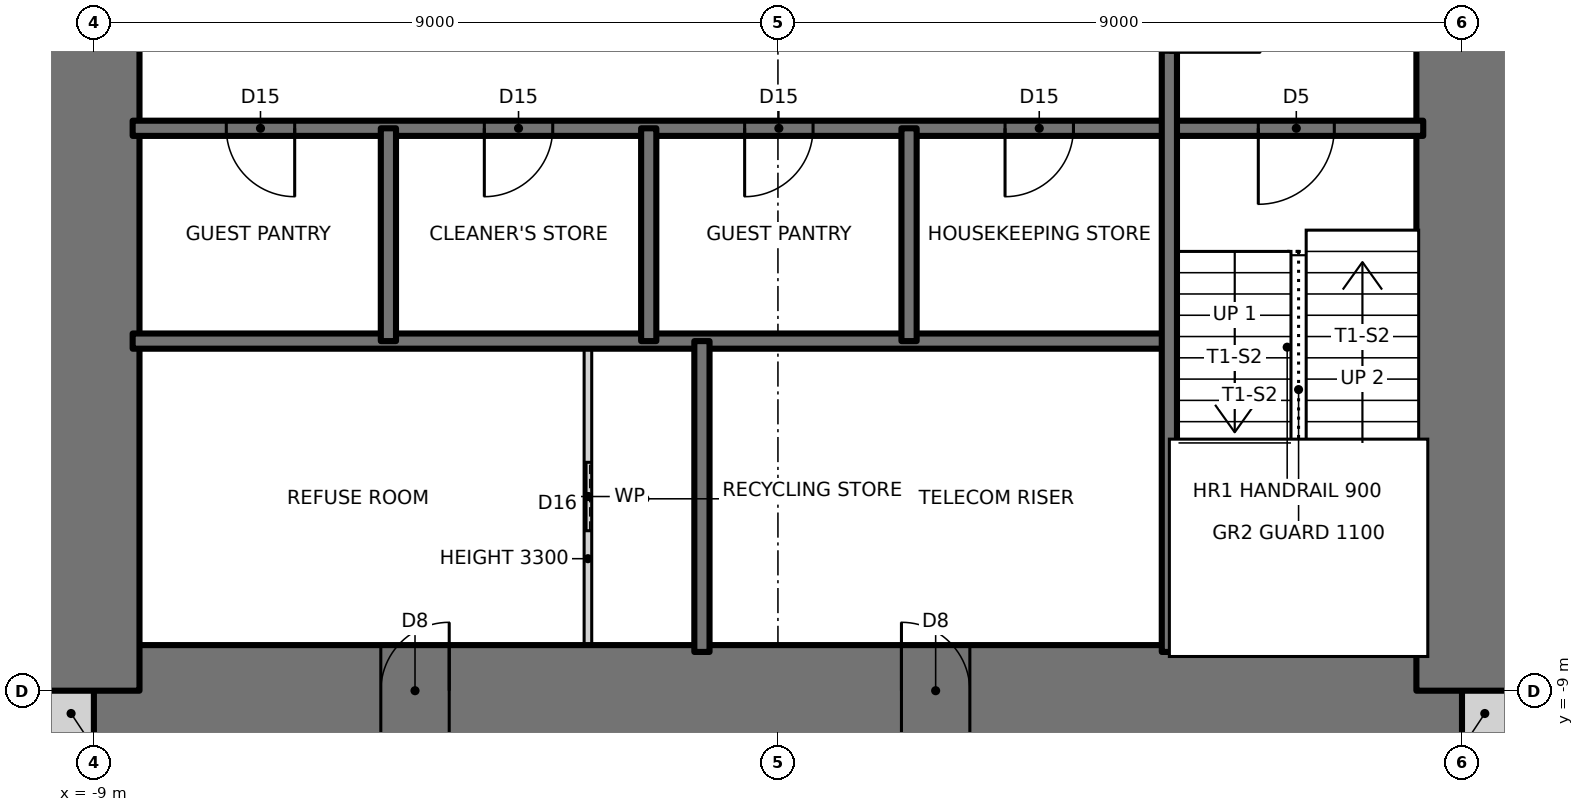
"""IFC4 building model, lengths in metres.
Left out: names, types, materials, properties, quantities, classifications, styles, units other than length and angle.
Written with IfcOpenShell. Run it as: python <this file> out.ifc"""

import sys

from ifc_helpers import new_model, si_unit, direction, frame, frame_2d, origin, place, context, subcontext, project, spatial, rectangle, extrude, element, fill, save


model = new_model("IFC4")
c1 = context("Model", 3, precision=1e-05, world=origin(), true_north=direction((0.0, 1.0)))
c2 = subcontext(c1, "Body", "Model", "MODEL_VIEW")
j1 = project(units=[si_unit("LENGTHUNIT", "METRE"), si_unit("PLANEANGLEUNIT", "RADIAN")], contexts=[c1])
p1 = place(None, origin())
s1 = spatial("IfcSite", under=j1, at=p1, CompositionType="ELEMENT")
p2 = place(p1, origin())
s2 = spatial("IfcBuilding", under=s1, at=p2, CompositionType="ELEMENT")
p3 = place(p2, frame((0.0, 0.0, 243.0)))
s3 = spatial("IfcBuildingStorey", under=s2, at=p3, CompositionType="ELEMENT", Elevation=243.0)
for number, where, z_axis, x_axis in (
    (1, (-9.6, -9.3, 0.0), (0.0, 0.0, 1.0), (1.0, 0.0, 0.0)),
    (2, (9.0, -9.3, 0.0), (0.0, 0.0, 1.0), (1.0, 0.0, 0.0)),
):
    element("IfcWall", number, at=place(p3, frame(where, z_axis=z_axis, x_axis=x_axis)), inside=s3, PredefinedType="SOLIDWALL", context=c2, shape_type="SweptSolid", body=[
        extrude(rectangle(XDim=0.6, YDim=0.6, at=frame_2d((0.3, 0.0))), origin(), (0.0, 0.0, 1.0), 3.5),
    ])
p4 = place(p3, frame((-9.0, -9.0, 0.0), z_axis=(0.0, 0.0, 1.0), x_axis=(1.0, 0.0, 0.0)))
e3 = element("IfcWall", 3, at=p4, inside=s3, PredefinedType="SHEAR", context=c2, shape_type="SweptSolid", body=[
    extrude(rectangle(XDim=18.0, YDim=1.2, at=frame_2d((9.0, 0.0))), origin(), (0.0, 0.0, 1.0), 3.5),
])
p5 = place(p4, frame((3.775, 0.0, 0.0)))
e4 = element("IfcOpeningElement", 4, at=p5, cuts=e3, PredefinedType="OPENING", context=c2, shape_type="SweptSolid", body=[
    extrude(rectangle(XDim=0.9, YDim=2.1, at=frame_2d((0.45, 1.05))), frame((0.0, 0.61, 0.0), z_axis=(0.0, -1.0, 0.0), x_axis=(1.0, 0.0, 0.0)), (0.0, 0.0, 1.0), 1.22),
])
p6 = place(p4, frame((10.625, 0.0, 0.0)))
e5 = element("IfcOpeningElement", 5, at=p6, cuts=e3, PredefinedType="OPENING", context=c2, shape_type="SweptSolid", body=[
    extrude(rectangle(XDim=0.9, YDim=2.1, at=frame_2d((0.45, 1.05))), frame((0.0, 0.61, 0.0), z_axis=(0.0, -1.0, 0.0), x_axis=(1.0, 0.0, 0.0)), (0.0, 0.0, 1.0), 1.22),
])
p7 = place(p3, frame((9.0, -9.0, 0.0), z_axis=(0.0, 0.0, 1.0), x_axis=(0.0, 1.0, 0.0)))
e6 = element("IfcWall", 6, at=p7, inside=s3, PredefinedType="SHEAR", context=c2, shape_type="SweptSolid", body=[
    extrude(rectangle(XDim=18.0, YDim=1.2, at=frame_2d((9.0, 0.0))), origin(), (0.0, 0.0, 1.0), 3.5),
])
p8 = place(p7, frame((8.5, 0.0, 0.0)))
e7 = element("IfcOpeningElement", 7, at=p8, cuts=e6, PredefinedType="OPENING", context=c2, shape_type="SweptSolid", body=[
    extrude(rectangle(XDim=1.0, YDim=2.1, at=frame_2d((0.5, 1.05))), frame((0.0, 0.61, 0.0), z_axis=(0.0, -1.0, 0.0), x_axis=(1.0, 0.0, 0.0)), (0.0, 0.0, 1.0), 1.22),
])
p9 = place(p3, frame((-9.0, 9.0, 0.0), z_axis=(0.0, 0.0, 1.0), x_axis=(0.0, -1.0, 0.0)))
e8 = element("IfcWall", 8, at=p9, inside=s3, PredefinedType="SHEAR", context=c2, shape_type="SweptSolid", body=[
    extrude(rectangle(XDim=18.0, YDim=1.2, at=frame_2d((9.0, 0.0))), origin(), (0.0, 0.0, 1.0), 3.5),
])
p10 = place(p9, frame((8.5, 0.0, 0.0)))
e9 = element("IfcOpeningElement", 9, at=p10, cuts=e8, PredefinedType="OPENING", context=c2, shape_type="SweptSolid", body=[
    extrude(rectangle(XDim=1.0, YDim=2.1, at=frame_2d((0.5, 1.05))), frame((0.0, 0.61, 0.0), z_axis=(0.0, -1.0, 0.0), x_axis=(1.0, 0.0, 0.0)), (0.0, 0.0, 1.0), 1.22),
])
p11 = place(p3, frame((-8.49, -4.4, 0.0), z_axis=(0.0, 0.0, 1.0), x_axis=(1.0, 0.0, 0.0)))
e10 = element("IfcWall", 10, at=p11, inside=s3, PredefinedType="SOLIDWALL", context=c2, shape_type="SweptSolid", body=[
    extrude(rectangle(XDim=13.64, YDim=0.2, at=frame_2d((6.82, 0.0))), origin(), (0.0, 0.0, 1.0), 3.5),
])
p12 = place(p3, frame((-8.49, -1.6, 0.0), z_axis=(0.0, 0.0, 1.0), x_axis=(1.0, 0.0, 0.0)))
e11 = element("IfcWall", 11, at=p12, inside=s3, PredefinedType="SOLIDWALL", context=c2, shape_type="SweptSolid", body=[
    extrude(rectangle(XDim=16.98, YDim=0.2, at=frame_2d((8.49, 0.0))), origin(), (0.0, 0.0, 1.0), 3.5),
])
p13 = place(p12, frame((14.81, 0.0, 0.0)))
e12 = element("IfcOpeningElement", 12, at=p13, cuts=e11, PredefinedType="OPENING", context=c2, shape_type="SweptSolid", body=[
    extrude(rectangle(XDim=1.0, YDim=2.1, at=frame_2d((0.5, 1.05))), frame((0.0, 0.11, 0.0), z_axis=(0.0, -1.0, 0.0), x_axis=(1.0, 0.0, 0.0)), (0.0, 0.0, 1.0), 0.22),
])
p14 = place(p12, frame((1.232, 0.0, 0.0)))
e13 = element("IfcOpeningElement", 13, at=p14, cuts=e11, PredefinedType="OPENING", context=c2, shape_type="SweptSolid", body=[
    extrude(rectangle(XDim=0.9, YDim=2.1, at=frame_2d((0.45, 1.05))), frame((0.0, 0.11, 0.0), z_axis=(0.0, -1.0, 0.0), x_axis=(1.0, 0.0, 0.0)), (0.0, 0.0, 1.0), 0.22),
])
p15 = place(p12, frame((4.627, 0.0, 0.0)))
e14 = element("IfcOpeningElement", 14, at=p15, cuts=e11, PredefinedType="OPENING", context=c2, shape_type="SweptSolid", body=[
    extrude(rectangle(XDim=0.9, YDim=2.1, at=frame_2d((0.45, 1.05))), frame((0.0, 0.11, 0.0), z_axis=(0.0, -1.0, 0.0), x_axis=(1.0, 0.0, 0.0)), (0.0, 0.0, 1.0), 0.22),
])
p16 = place(p12, frame((8.052, 0.0, 0.0)))
e15 = element("IfcOpeningElement", 15, at=p16, cuts=e11, PredefinedType="OPENING", context=c2, shape_type="SweptSolid", body=[
    extrude(rectangle(XDim=0.9, YDim=2.1, at=frame_2d((0.45, 1.05))), frame((0.0, 0.11, 0.0), z_axis=(0.0, -1.0, 0.0), x_axis=(1.0, 0.0, 0.0)), (0.0, 0.0, 1.0), 0.22),
])
p17 = place(p12, frame((11.478, 0.0, 0.0)))
e16 = element("IfcOpeningElement", 16, at=p17, cuts=e11, PredefinedType="OPENING", context=c2, shape_type="SweptSolid", body=[
    extrude(rectangle(XDim=0.9, YDim=2.1, at=frame_2d((0.45, 1.05))), frame((0.0, 0.11, 0.0), z_axis=(0.0, -1.0, 0.0), x_axis=(1.0, 0.0, 0.0)), (0.0, 0.0, 1.0), 0.22),
])
p18 = place(p3, frame((5.15, -8.49, 0.0), z_axis=(0.0, 0.0, 1.0), x_axis=(0.0, 1.0, 0.0)))
e17 = element("IfcWall", 17, at=p18, inside=s3, PredefinedType="SOLIDWALL", context=c2, shape_type="SweptSolid", body=[
    extrude(rectangle(XDim=13.09, YDim=0.2, at=frame_2d((6.545, 0.0))), origin(), (0.0, 0.0, 1.0), 3.5),
])
p19 = place(p18, frame((7.89, 0.0, 0.0)))
e18 = element("IfcOpeningElement", 18, at=p19, cuts=e17, PredefinedType="OPENING", context=c2, shape_type="SweptSolid", body=[
    extrude(rectangle(XDim=1.2, YDim=2.1, at=frame_2d((0.6, 1.05))), frame((0.0, 0.11, 0.0), z_axis=(0.0, -1.0, 0.0), x_axis=(1.0, 0.0, 0.0)), (0.0, 0.0, 1.0), 0.22),
])
p20 = place(p3, frame((1.725, -4.4, 0.0), z_axis=(0.0, 0.0, 1.0), x_axis=(0.0, 1.0, 0.0)))
e19 = element("IfcWall", 19, at=p20, inside=s3, PredefinedType="SOLIDWALL", context=c2, shape_type="SweptSolid", body=[
    extrude(rectangle(XDim=2.8, YDim=0.2, at=frame_2d((1.4, 0.0))), origin(), (0.0, 0.0, 1.0), 3.5),
])
p21 = place(p3, frame((-1.0, -8.49, 0.0), z_axis=(0.0, 0.0, 1.0), x_axis=(0.0, 1.0, 0.0)))
e20 = element("IfcWall", 20, at=p21, inside=s3, PredefinedType="SOLIDWALL", context=c2, shape_type="SweptSolid", body=[
    extrude(rectangle(XDim=4.09, YDim=0.2, at=frame_2d((2.045, 0.0))), origin(), (0.0, 0.0, 1.0), 3.5),
])
p22 = place(p3, frame((-1.7, -4.4, 0.0), z_axis=(0.0, 0.0, 1.0), x_axis=(0.0, 1.0, 0.0)))
e21 = element("IfcWall", 21, at=p22, inside=s3, PredefinedType="SOLIDWALL", context=c2, shape_type="SweptSolid", body=[
    extrude(rectangle(XDim=2.8, YDim=0.2, at=frame_2d((1.4, 0.0))), origin(), (0.0, 0.0, 1.0), 3.5),
])
p23 = place(p3, frame((-2.5, -8.49, 0.0), z_axis=(0.0, 0.0, 1.0), x_axis=(0.0, 1.0, 0.0)))
e22 = element("IfcWall", 22, at=p23, inside=s3, PredefinedType="PARTITIONING", context=c2, shape_type="SweptSolid", body=[
    extrude(rectangle(XDim=4.09, YDim=0.1, at=frame_2d((2.045, 0.0))), origin(), (0.0, 0.0, 1.0), 3.3),
])
p24 = place(p23, frame((1.595, 0.0, 0.0)))
e23 = element("IfcOpeningElement", 23, at=p24, cuts=e22, PredefinedType="OPENING", context=c2, shape_type="SweptSolid", body=[
    extrude(rectangle(XDim=0.9, YDim=2.1, at=frame_2d((0.45, 1.05))), frame((0.0, 0.06, 0.0), z_axis=(0.0, -1.0, 0.0), x_axis=(1.0, 0.0, 0.0)), (0.0, 0.0, 1.0), 0.12),
])
p25 = place(p3, frame((-5.125, -4.4, 0.0), z_axis=(0.0, 0.0, 1.0), x_axis=(0.0, 1.0, 0.0)))
e24 = element("IfcWall", 24, at=p25, inside=s3, PredefinedType="SOLIDWALL", context=c2, shape_type="SweptSolid", body=[
    extrude(rectangle(XDim=2.8, YDim=0.2, at=frame_2d((1.4, 0.0))), origin(), (0.0, 0.0, 1.0), 3.5),
])
p26 = place(p13, frame((1.0, 0.0, 0.0), z_axis=(0.0, 0.0, 1.0), x_axis=(-1.0, 0.0, 0.0)))
e25 = element("IfcDoor", 25, at=p26, inside=s3, OperationType="SINGLE_SWING_RIGHT", PredefinedType="DOOR", context=c2, shape_type="SweptSolid", body=[
    extrude(rectangle(XDim=1.0, YDim=2.1, at=frame_2d((0.5, 1.05))), frame((0.0, 0.025, 0.0), z_axis=(0.0, -1.0, 0.0), x_axis=(1.0, 0.0, 0.0)), (0.0, 0.0, 1.0), 0.05),
])
fill(e12, e25)
p27 = place(p19, frame((1.2, 0.0, 0.0), z_axis=(0.0, 0.0, 1.0), x_axis=(-1.0, 0.0, 0.0)))
e26 = element("IfcDoor", 26, at=p27, inside=s3, OperationType="SINGLE_SWING_RIGHT", PredefinedType="DOOR", context=c2, shape_type="SweptSolid", body=[
    extrude(rectangle(XDim=1.2, YDim=2.1, at=frame_2d((0.6, 1.05))), frame((0.0, 0.025, 0.0), z_axis=(0.0, -1.0, 0.0), x_axis=(1.0, 0.0, 0.0)), (0.0, 0.0, 1.0), 0.05),
])
fill(e18, e26)
p28 = place(p14, frame((0.9, 0.0, 0.0), z_axis=(0.0, 0.0, 1.0), x_axis=(-1.0, 0.0, 0.0)))
e27 = element("IfcDoor", 27, at=p28, inside=s3, OperationType="SINGLE_SWING_LEFT", PredefinedType="DOOR", context=c2, shape_type="SweptSolid", body=[
    extrude(rectangle(XDim=0.9, YDim=2.1, at=frame_2d((0.45, 1.05))), frame((0.0, 0.025, 0.0), z_axis=(0.0, -1.0, 0.0), x_axis=(1.0, 0.0, 0.0)), (0.0, 0.0, 1.0), 0.05),
])
fill(e13, e27)
p29 = place(p15, frame((0.9, 0.0, 0.0), z_axis=(0.0, 0.0, 1.0), x_axis=(-1.0, 0.0, 0.0)))
e28 = element("IfcDoor", 28, at=p29, inside=s3, OperationType="SINGLE_SWING_RIGHT", PredefinedType="DOOR", context=c2, shape_type="SweptSolid", body=[
    extrude(rectangle(XDim=0.9, YDim=2.1, at=frame_2d((0.45, 1.05))), frame((0.0, 0.025, 0.0), z_axis=(0.0, -1.0, 0.0), x_axis=(1.0, 0.0, 0.0)), (0.0, 0.0, 1.0), 0.05),
])
fill(e14, e28)
p30 = place(p16, frame((0.9, 0.0, 0.0), z_axis=(0.0, 0.0, 1.0), x_axis=(-1.0, 0.0, 0.0)))
e29 = element("IfcDoor", 29, at=p30, inside=s3, OperationType="SINGLE_SWING_RIGHT", PredefinedType="DOOR", context=c2, shape_type="SweptSolid", body=[
    extrude(rectangle(XDim=0.9, YDim=2.1, at=frame_2d((0.45, 1.05))), frame((0.0, 0.025, 0.0), z_axis=(0.0, -1.0, 0.0), x_axis=(1.0, 0.0, 0.0)), (0.0, 0.0, 1.0), 0.05),
])
fill(e15, e29)
p31 = place(p17, frame((0.9, 0.0, 0.0), z_axis=(0.0, 0.0, 1.0), x_axis=(-1.0, 0.0, 0.0)))
e30 = element("IfcDoor", 30, at=p31, inside=s3, OperationType="SINGLE_SWING_RIGHT", PredefinedType="DOOR", context=c2, shape_type="SweptSolid", body=[
    extrude(rectangle(XDim=0.9, YDim=2.1, at=frame_2d((0.45, 1.05))), frame((0.0, 0.025, 0.0), z_axis=(0.0, -1.0, 0.0), x_axis=(1.0, 0.0, 0.0)), (0.0, 0.0, 1.0), 0.05),
])
fill(e16, e30)
p32 = place(p24, origin())
e31 = element("IfcDoor", 31, at=p32, inside=s3, OperationType="SLIDING_TO_LEFT", PredefinedType="DOOR", context=c2, shape_type="SweptSolid", body=[
    extrude(rectangle(XDim=0.9, YDim=2.1, at=frame_2d((0.45, 1.05))), frame((0.0, 0.025, 0.0), z_axis=(0.0, -1.0, 0.0), x_axis=(1.0, 0.0, 0.0)), (0.0, 0.0, 1.0), 0.05),
])
fill(e23, e31)
p33 = place(p5, origin())
e32 = element("IfcDoor", 32, at=p33, inside=s3, OperationType="SINGLE_SWING_RIGHT", PredefinedType="DOOR", context=c2, shape_type="SweptSolid", body=[
    extrude(rectangle(XDim=0.9, YDim=2.1, at=frame_2d((0.45, 1.05))), frame((0.0, 0.025, 0.0), z_axis=(0.0, -1.0, 0.0), x_axis=(1.0, 0.0, 0.0)), (0.0, 0.0, 1.0), 0.05),
])
fill(e4, e32)
p34 = place(p6, origin())
e33 = element("IfcDoor", 33, at=p34, inside=s3, OperationType="SINGLE_SWING_LEFT", PredefinedType="DOOR", context=c2, shape_type="SweptSolid", body=[
    extrude(rectangle(XDim=0.9, YDim=2.1, at=frame_2d((0.45, 1.05))), frame((0.0, 0.025, 0.0), z_axis=(0.0, -1.0, 0.0), x_axis=(1.0, 0.0, 0.0)), (0.0, 0.0, 1.0), 0.05),
])
fill(e5, e33)
save(model, sys.argv[1])
